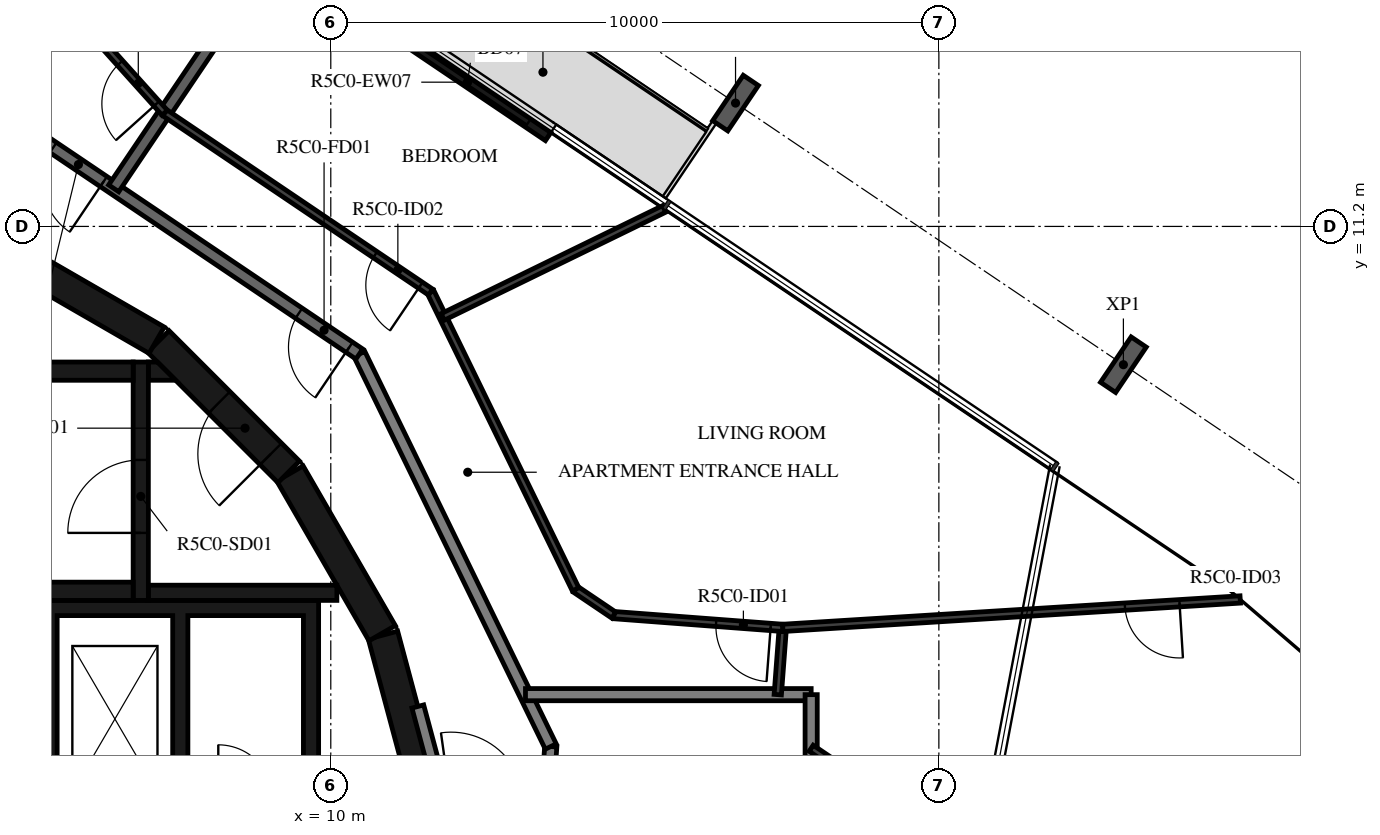
"""IFC4 building model, lengths in metres.
Left out: names, types, materials, properties, quantities, classifications, styles, units other than length and angle.
Written with IfcOpenShell. Run it as: python <this file> out.ifc"""

import sys

from ifc_helpers import new_model, si_unit, direction, frame, frame_2d, origin, origin_2d, place, context, subcontext, project, spatial, polyline, rectangle, i_section, outline, extrude, element, fill, save


model = new_model("IFC4")
c1 = context("Model", 3, precision=1e-05, world=origin(), true_north=direction((0.0, 1.0)))
c2 = subcontext(c1, "Body", "Model", "MODEL_VIEW")
j1 = project(units=[si_unit("LENGTHUNIT", "METRE"), si_unit("PLANEANGLEUNIT", "RADIAN")], contexts=[c1])
p1 = place(None, origin())
s1 = spatial("IfcSite", under=j1, at=p1, CompositionType="ELEMENT")
p2 = place(p1, origin())
s2 = spatial("IfcBuilding", under=s1, at=p2, CompositionType="ELEMENT")
p3 = place(p2, frame((0.0, 0.0, 216.4)))
s3 = spatial("IfcBuildingStorey", under=s2, at=p3, CompositionType="ELEMENT", Elevation=216.4)
for number, where, z_axis, x_axis in (
    (1, (23.035, 8.926, -0.38), (0.0, 0.0, 1.0), (0.829, -0.559, 0.0)),
    (2, (16.656, 13.228, -0.38), (0.0, 0.0, 1.0), (0.829, -0.559, 0.0)),
):
    element("IfcColumn", number, at=place(p3, frame(where, z_axis=z_axis, x_axis=x_axis)), inside=s3, PredefinedType="COLUMN", context=c2, shape_type="SweptSolid", body=[
        extrude(i_section(OverallWidth=0.3, OverallDepth=0.9, WebThickness=0.019, FlangeThickness=0.035, FilletRadius=0.03, at=origin_2d()), origin(), (0.0, 0.0, 1.0), 2.616),
    ])
p4 = place(p3, frame((13.574, 12.677, 0.0), z_axis=(0.0, 0.0, 1.0), x_axis=(-0.829068838882, 0.55914654644, 0.0)))
e3 = element("IfcWall", 3, at=p4, inside=s3, PredefinedType="STANDARD", context=c2, shape_type="SweptSolid", body=[
    extrude(rectangle(XDim=3.2, YDim=0.16, at=frame_2d((1.6, 0.0))), origin(), (0.0, 0.0, 1.0), 3.05),
])
p5 = place(p4, frame((0.4, 0.0, 0.0)))
e4 = element("IfcOpeningElement", 4, at=p5, cuts=e3, PredefinedType="OPENING", context=c2, shape_type="SweptSolid", body=[
    extrude(rectangle(XDim=2.4, YDim=2.4, at=frame_2d((1.2, 1.2))), frame((0.0, 0.09, 0.0), z_axis=(0.0, -1.0, 0.0), x_axis=(1.0, 0.0, 0.0)), (0.0, 0.0, 1.0), 0.18),
])
for number, where, z_axis, x_axis in (
    (5, (11.643, 1.55, 0.0), (0.0, 0.0, 1.0), (-0.259, 0.966, 0.0)),
    (6, (10.845, 4.51, 0.0), (0.0, 0.0, 1.0), (-0.5, 0.866, 0.0)),
):
    element("IfcWall", number, at=place(p3, frame(where, z_axis=z_axis, x_axis=x_axis)), inside=s3, PredefinedType="SHEAR", context=c2, shape_type="SweptSolid", body=[
        extrude(rectangle(XDim=3.033, YDim=0.5, at=frame_2d((1.516, 0.0))), origin(), (0.0, 0.0, 1.0), 3.05),
    ])
p6 = place(p3, frame((9.308, 7.164, 0.0), z_axis=(0.0, 0.0, 1.0), x_axis=(-0.707106781187, 0.707106781187, 0.0)))
e7 = element("IfcWall", 7, at=p6, inside=s3, PredefinedType="SHEAR", context=c2, shape_type="SweptSolid", body=[
    extrude(rectangle(XDim=3.032, YDim=0.5, at=frame_2d((1.516, 0.0))), origin(), (0.0, 0.0, 1.0), 3.05),
])
p7 = place(p6, frame((0.416, 0.0, 0.0)))
e8 = element("IfcOpeningElement", 8, at=p7, cuts=e7, PredefinedType="OPENING", context=c2, shape_type="SweptSolid", body=[
    extrude(rectangle(XDim=1.2, YDim=2.1, at=frame_2d((0.6, 1.05))), frame((0.0, 0.26, 0.0), z_axis=(0.0, -1.0, 0.0), x_axis=(1.0, 0.0, 0.0)), (0.0, 0.0, 1.0), 0.52),
])
p8 = place(p3, frame((7.137, 9.329, 0.0), z_axis=(0.0, 0.0, 1.0), x_axis=(-0.865975092491, 0.500087131594, 0.0)))
e9 = element("IfcWall", 9, at=p8, inside=s3, PredefinedType="SHEAR", context=c2, shape_type="SweptSolid", body=[
    extrude(rectangle(XDim=3.033, YDim=0.5, at=frame_2d((1.516, 0.0))), origin(), (0.0, 0.0, 1.0), 3.05),
])
for number, where, z_axis, x_axis in (
    (10, (0.0, 5.2, 0.0), (0.0, 0.0, 1.0), (1.0, 0.0, 0.0)),
    (11, (0.0, 8.82, 0.0), (0.0, 0.0, 1.0), (1.0, 0.0, 0.0)),
):
    element("IfcWall", number, at=place(p3, frame(where, z_axis=z_axis, x_axis=x_axis)), inside=s3, PredefinedType="SHEAR", context=c2, shape_type="SweptSolid", body=[
        extrude(rectangle(XDim=6.75, YDim=0.3, at=frame_2d((3.375, 0.0))), origin(), (0.0, 0.0, 1.0), 3.05),
    ])
p9 = place(p3, frame((6.875, 5.05, 0.0), z_axis=(0.0, 0.0, 1.0), x_axis=(0.0, 1.0, 0.0)))
e12 = element("IfcWall", 12, at=p9, inside=s3, PredefinedType="SHEAR", context=c2, shape_type="SweptSolid", body=[
    extrude(rectangle(XDim=3.92, YDim=0.25, at=frame_2d((1.96, 0.0))), origin(), (0.0, 0.0, 1.0), 3.05),
])
p10 = place(p9, frame((1.11, 0.0, 0.0)))
e13 = element("IfcOpeningElement", 13, at=p10, cuts=e12, PredefinedType="OPENING", context=c2, shape_type="SweptSolid", body=[
    extrude(rectangle(XDim=1.2, YDim=2.1, at=frame_2d((0.6, 1.05))), frame((0.0, 0.135, 0.0), z_axis=(0.0, -1.0, 0.0), x_axis=(1.0, 0.0, 0.0)), (0.0, 0.0, 1.0), 0.27),
])
p11 = place(p3, frame((7.0, 5.175, 0.0), z_axis=(0.0, 0.0, 1.0), x_axis=(1.0, 0.0, 0.0)))
e14 = element("IfcWall", 14, at=p11, inside=s3, PredefinedType="SHEAR", context=c2, shape_type="SweptSolid", body=[
    extrude(rectangle(XDim=3.1, YDim=0.25, at=frame_2d((1.55, 0.0))), origin(), (0.0, 0.0, 1.0), 3.05),
])
p12 = place(p3, origin())
e15 = element("IfcWall", 15, at=p12, inside=s3, PredefinedType="SHEAR", context=c2, shape_type="SweptSolid", body=[
    extrude(outline(polyline([(7.448, 8.67), (7.0, 8.67), (7.0, 8.97), (7.148, 8.97), (7.448, 8.67)])), origin(), (0.0, 0.0, 1.0), 3.05),
])
p13 = place(p3, origin())
e16 = element("IfcWall", 16, at=p13, inside=s3, PredefinedType="SHEAR", context=c2, shape_type="SweptSolid", body=[
    extrude(outline(polyline([(-9.55, 4.8), (-5.5, 4.8), (-5.5, 1.9), (-5.25, 1.9), (-5.25, 4.8), (-1.2, 4.8), (-1.2, 1.9), (-0.95, 1.9), (-0.95, 4.8), (0.95, 4.8), (0.95, 1.9), (1.2, 1.9), (1.2, 4.8), (3.1, 4.8), (3.1, 1.9), (3.35, 1.9), (3.35, 4.8), (5.25, 4.8), (5.25, 1.9), (5.5, 1.9), (5.5, 4.8), (7.4, 4.8), (7.4, 1.9), (7.65, 1.9), (7.65, 4.8), (9.55, 4.8), (9.55, 1.9), (9.8, 1.9), (9.8, 4.8), (9.8, 5.05), (-9.8, 5.05), (-9.8, 4.8), (-9.8, 1.9), (-9.55, 1.9), (-9.55, 4.8)])), origin(), (0.0, 0.0, 1.0), 3.05),
])
p14 = place(p3, frame((11.87, 1.668, 0.0), z_axis=(0.0, 0.0, 1.0), x_axis=(-0.258836880648, 0.965921047093, 0.0)))
e17 = element("IfcWall", 17, at=p14, inside=s3, PredefinedType="STANDARD", context=c2, shape_type="SweptSolid", body=[
    extrude(rectangle(XDim=1.695, YDim=0.2, at=frame_2d((0.848, 0.0))), origin(), (0.0, 0.0, 1.0), 3.05),
])
p15 = place(p3, frame((13.566, 1.906, 0.0), z_axis=(0.0, 0.0, 1.0), x_axis=(0.07005495793, 0.997543133338, 0.0)))
e18 = element("IfcWall", 18, at=p15, inside=s3, PredefinedType="STANDARD", context=c2, shape_type="SweptSolid", body=[
    extrude(rectangle(XDim=0.742, YDim=0.2, at=frame_2d((0.371, 0.0))), origin(), (0.0, 0.0, 1.0), 3.05),
])
p16 = place(p3, frame((13.618, 2.647, 0.0), z_axis=(0.0, 0.0, 1.0), x_axis=(-0.438366026218, 0.898796543751, 0.0)))
e19 = element("IfcWall", 19, at=p16, inside=s3, PredefinedType="STANDARD", context=c2, shape_type="SweptSolid", body=[
    extrude(rectangle(XDim=7.181, YDim=0.2, at=frame_2d((3.591, 0.0))), origin(), (0.0, 0.0, 1.0), 3.05),
])
p17 = place(p3, frame((10.47, 9.101, 0.0), z_axis=(0.0, 0.0, 1.0), x_axis=(-0.829035841718, 0.559195469534, 0.0)))
e20 = element("IfcWall", 20, at=p17, inside=s3, PredefinedType="STANDARD", context=c2, shape_type="SweptSolid", body=[
    extrude(rectangle(XDim=7.181, YDim=0.2, at=frame_2d((3.591, 0.0))), origin(), (0.0, 0.0, 1.0), 3.05),
])
p18 = place(p17, frame((0.2, 0.0, 0.0)))
e21 = element("IfcOpeningElement", 21, at=p18, cuts=e20, PredefinedType="OPENING", context=c2, shape_type="SweptSolid", body=[
    extrude(rectangle(XDim=1.0, YDim=2.1, at=frame_2d((0.5, 1.05))), frame((0.0, 0.11, 0.0), z_axis=(0.0, -1.0, 0.0), x_axis=(1.0, 0.0, 0.0)), (0.0, 0.0, 1.0), 0.22),
])
p19 = place(p17, frame((5.073, 0.0, 0.0)))
e22 = element("IfcOpeningElement", 22, at=p19, cuts=e20, PredefinedType="OPENING", context=c2, shape_type="SweptSolid", body=[
    extrude(rectangle(XDim=1.0, YDim=2.1, at=frame_2d((0.5, 1.05))), frame((0.0, 0.11, 0.0), z_axis=(0.0, -1.0, 0.0), x_axis=(1.0, 0.0, 0.0)), (0.0, 0.0, 1.0), 0.22),
])
p20 = place(p3, frame((17.9, 3.5, 0.0), z_axis=(0.0, 0.0, 1.0), x_axis=(-1.0, 0.0, 0.0)))
e23 = element("IfcWall", 23, at=p20, inside=s3, PredefinedType="STANDARD", context=c2, shape_type="SweptSolid", body=[
    extrude(rectangle(XDim=4.698, YDim=0.2, at=frame_2d((2.349, 0.0))), origin(), (0.0, 0.0, 1.0), 3.05),
])
p21 = place(p3, frame((17.9, -3.5, 0.0), z_axis=(0.0, 0.0, 1.0), x_axis=(0.0, 1.0, 0.0)))
e24 = element("IfcWall", 24, at=p21, inside=s3, PredefinedType="STANDARD", context=c2, shape_type="SweptSolid", body=[
    extrude(rectangle(XDim=7.0, YDim=0.2, at=frame_2d((3.5, 0.0))), origin(), (0.0, 0.0, 1.0), 3.05),
])
p22 = place(p3, frame((9.104, 15.79, 0.0), z_axis=(0.0, 0.0, 1.0), x_axis=(-0.559193912135, -0.829036892201, 0.0)))
e25 = element("IfcWall", 25, at=p22, inside=s3, PredefinedType="STANDARD", context=c2, shape_type="SweptSolid", body=[
    extrude(rectangle(XDim=4.781, YDim=0.2, at=frame_2d((2.39, 0.0))), origin(), (0.0, 0.0, 1.0), 3.05),
])
p23 = place(p3, frame((17.351, 3.5, 0.0), z_axis=(0.0, 0.0, 1.0), x_axis=(0.075374124137, 0.997155324616, 0.0)))
e26 = element("IfcWall", 26, at=p23, inside=s3, PredefinedType="PARTITIONING", context=c2, shape_type="SweptSolid", body=[
    extrude(rectangle(XDim=1.101, YDim=0.12, at=frame_2d((0.551, 0.0))), origin(), (0.0, 0.0, 1.0), 3.05),
])
p24 = place(p3, frame((17.434, 4.598, 0.0), z_axis=(0.0, 0.0, 1.0), x_axis=(-0.997152077354, 0.075417071205, 0.0)))
e27 = element("IfcWall", 27, at=p24, inside=s3, PredefinedType="PARTITIONING", context=c2, shape_type="SweptSolid", body=[
    extrude(rectangle(XDim=2.787, YDim=0.12, at=frame_2d((1.394, 0.0))), origin(), (0.0, 0.0, 1.0), 3.05),
])
p25 = place(p24, frame((0.2, 0.0, 0.0)))
e28 = element("IfcOpeningElement", 28, at=p25, cuts=e27, PredefinedType="OPENING", context=c2, shape_type="SweptSolid", body=[
    extrude(rectangle(XDim=0.9, YDim=2.1, at=frame_2d((0.45, 1.05))), frame((0.0, 0.07, 0.0), z_axis=(0.0, -1.0, 0.0), x_axis=(1.0, 0.0, 0.0)), (0.0, 0.0, 1.0), 0.14),
])
p26 = place(p3, frame((14.654, 4.808, 0.0), z_axis=(0.0, 0.0, 1.0), x_axis=(-0.829065184024, 0.559151965604, 0.0)))
e29 = element("IfcWall", 29, at=p26, inside=s3, PredefinedType="PARTITIONING", context=c2, shape_type="SweptSolid", body=[
    extrude(rectangle(XDim=0.758, YDim=0.12, at=frame_2d((0.379, 0.0))), origin(), (0.0, 0.0, 1.0), 3.05),
])
p27 = place(p3, frame((14.026, 5.232, 0.0), z_axis=(0.0, 0.0, 1.0), x_axis=(-0.438374985284, 0.89879217413, 0.0)))
e30 = element("IfcWall", 30, at=p27, inside=s3, PredefinedType="PARTITIONING", context=c2, shape_type="SweptSolid", body=[
    extrude(rectangle(XDim=5.438, YDim=0.12, at=frame_2d((2.719, 0.0))), origin(), (0.0, 0.0, 1.0), 3.05),
])
p28 = place(p3, frame((11.642, 10.12, 0.0), z_axis=(0.0, 0.0, 1.0), x_axis=(-0.829054664054, 0.559167563446, 0.0)))
e31 = element("IfcWall", 31, at=p28, inside=s3, PredefinedType="PARTITIONING", context=c2, shape_type="SweptSolid", body=[
    extrude(rectangle(XDim=5.275, YDim=0.12, at=frame_2d((2.637, 0.0))), origin(), (0.0, 0.0, 1.0), 3.05),
])
p29 = place(p28, frame((0.2, 0.0, 0.0)))
e32 = element("IfcOpeningElement", 32, at=p29, cuts=e31, PredefinedType="OPENING", context=c2, shape_type="SweptSolid", body=[
    extrude(rectangle(XDim=0.9, YDim=2.1, at=frame_2d((0.45, 1.05))), frame((0.0, 0.07, 0.0), z_axis=(0.0, -1.0, 0.0), x_axis=(1.0, 0.0, 0.0)), (0.0, 0.0, 1.0), 0.14),
])
p30 = place(p3, frame((21.141, 0.433, 0.0), z_axis=(0.0, 0.0, 1.0), x_axis=(-0.829049908454, 0.559174614313, 0.0)))
e33 = element("IfcWall", 33, at=p30, inside=s3, PredefinedType="PARTITIONING", context=c2, shape_type="SweptSolid", body=[
    extrude(rectangle(XDim=3.909, YDim=0.12, at=frame_2d((1.955, 0.0))), origin(), (0.0, 0.0, 1.0), 3.05),
])
p31 = place(p30, frame((0.8, 0.0, 0.0)))
e34 = element("IfcOpeningElement", 34, at=p31, cuts=e33, PredefinedType="OPENING", context=c2, shape_type="SweptSolid", body=[
    extrude(rectangle(XDim=0.8, YDim=2.1, at=frame_2d((0.4, 1.05))), frame((0.0, 0.07, 0.0), z_axis=(0.0, -1.0, 0.0), x_axis=(1.0, 0.0, 0.0)), (0.0, 0.0, 1.0), 0.14),
])
p32 = place(p3, frame((24.956, 5.065, 0.0), z_axis=(0.0, 0.0, 1.0), x_axis=(-0.998076202118, -0.061999151332, 0.0)))
e35 = element("IfcWall", 35, at=p32, inside=s3, PredefinedType="PARTITIONING", context=c2, shape_type="SweptSolid", body=[
    extrude(rectangle(XDim=7.537, YDim=0.12, at=frame_2d((3.769, 0.0))), origin(), (0.0, 0.0, 1.0), 3.05),
])
p33 = place(p32, frame((1.0, 0.0, 0.0)))
e36 = element("IfcOpeningElement", 36, at=p33, cuts=e35, PredefinedType="OPENING", context=c2, shape_type="SweptSolid", body=[
    extrude(rectangle(XDim=0.9, YDim=2.1, at=frame_2d((0.45, 1.05))), frame((0.0, 0.07, 0.0), z_axis=(0.0, -1.0, 0.0), x_axis=(1.0, 0.0, 0.0)), (0.0, 0.0, 1.0), 0.14),
])
p34 = place(p3, frame((21.95, -0.382, 0.0), z_axis=(0.0, 0.0, 1.0), x_axis=(0.844596663126, 0.535403097336, 0.0)))
e37 = element("IfcWall", 37, at=p34, inside=s3, PredefinedType="PARTITIONING", context=c2, shape_type="SweptSolid", body=[
    extrude(rectangle(XDim=6.022, YDim=0.12, at=frame_2d((3.011, 0.0))), origin(), (0.0, 0.0, 1.0), 3.05),
])
p35 = place(p34, frame((0.6, 0.0, 0.0)))
e38 = element("IfcOpeningElement", 38, at=p35, cuts=e37, PredefinedType="OPENING", context=c2, shape_type="SweptSolid", body=[
    extrude(rectangle(XDim=0.9, YDim=2.1, at=frame_2d((0.45, 1.05))), frame((0.0, 0.07, 0.0), z_axis=(0.0, -1.0, 0.0), x_axis=(1.0, 0.0, 0.0)), (0.0, 0.0, 1.0), 0.14),
])
p36 = place(p3, frame((15.482, 11.487, 0.0), z_axis=(0.0, 0.0, 1.0), x_axis=(-0.898807251285, -0.438344071521, 0.0)))
e39 = element("IfcWall", 39, at=p36, inside=s3, PredefinedType="PARTITIONING", context=c2, shape_type="SweptSolid", body=[
    extrude(rectangle(XDim=4.051, YDim=0.12, at=frame_2d((2.025, 0.0))), origin(), (0.0, 0.0, 1.0), 3.05),
])
p37 = place(p3, frame((7.269, 13.07, 0.0), z_axis=(0.0, 0.0, 1.0), x_axis=(-0.668495993587, 0.743715743116, 0.0)))
e40 = element("IfcWall", 40, at=p37, inside=s3, PredefinedType="PARTITIONING", context=c2, shape_type="SweptSolid", body=[
    extrude(rectangle(XDim=3.281, YDim=0.12, at=frame_2d((1.641, 0.0))), origin(), (0.0, 0.0, 1.0), 3.05),
])
p38 = place(p37, frame((0.2, 0.0, 0.0)))
e41 = element("IfcOpeningElement", 41, at=p38, cuts=e40, PredefinedType="OPENING", context=c2, shape_type="SweptSolid", body=[
    extrude(rectangle(XDim=0.9, YDim=2.1, at=frame_2d((0.45, 1.05))), frame((0.0, 0.07, 0.0), z_axis=(0.0, -1.0, 0.0), x_axis=(1.0, 0.0, 0.0)), (0.0, 0.0, 1.0), 0.14),
])
p39 = place(p5, origin())
e42 = element("IfcDoor", 42, at=p39, inside=s3, OperationType="DOUBLE_DOOR_SLIDING", PredefinedType="DOOR", context=c2, shape_type="SweptSolid", body=[
    extrude(rectangle(XDim=2.4, YDim=2.4, at=frame_2d((1.2, 1.2))), frame((0.0, 0.025, 0.0), z_axis=(0.0, -1.0, 0.0), x_axis=(1.0, 0.0, 0.0)), (0.0, 0.0, 1.0), 0.05),
])
fill(e4, e42)
p40 = place(p10, origin())
e43 = element("IfcDoor", 43, at=p40, inside=s3, OperationType="SINGLE_SWING_LEFT", PredefinedType="DOOR", context=c2, shape_type="SweptSolid", body=[
    extrude(rectangle(XDim=1.2, YDim=2.1, at=frame_2d((0.6, 1.05))), frame((0.0, 0.025, 0.0), z_axis=(0.0, -1.0, 0.0), x_axis=(1.0, 0.0, 0.0)), (0.0, 0.0, 1.0), 0.05),
])
fill(e13, e43)
p41 = place(p7, origin())
e44 = element("IfcDoor", 44, at=p41, inside=s3, OperationType="SINGLE_SWING_RIGHT", PredefinedType="DOOR", context=c2, shape_type="SweptSolid", body=[
    extrude(rectangle(XDim=1.2, YDim=2.1, at=frame_2d((0.6, 1.05))), frame((0.0, 0.025, 0.0), z_axis=(0.0, -1.0, 0.0), x_axis=(1.0, 0.0, 0.0)), (0.0, 0.0, 1.0), 0.05),
])
fill(e8, e44)
p42 = place(p18, origin())
e45 = element("IfcDoor", 45, at=p42, inside=s3, OperationType="SINGLE_SWING_LEFT", PredefinedType="DOOR", context=c2, shape_type="SweptSolid", body=[
    extrude(rectangle(XDim=1.0, YDim=2.1, at=frame_2d((0.5, 1.05))), frame((0.0, 0.025, 0.0), z_axis=(0.0, -1.0, 0.0), x_axis=(1.0, 0.0, 0.0)), (0.0, 0.0, 1.0), 0.05),
])
fill(e21, e45)
p43 = place(p25, origin())
e46 = element("IfcDoor", 46, at=p43, inside=s3, OperationType="SINGLE_SWING_LEFT", PredefinedType="DOOR", context=c2, shape_type="SweptSolid", body=[
    extrude(rectangle(XDim=0.9, YDim=2.1, at=frame_2d((0.45, 1.05))), frame((0.0, 0.025, 0.0), z_axis=(0.0, -1.0, 0.0), x_axis=(1.0, 0.0, 0.0)), (0.0, 0.0, 1.0), 0.05),
])
fill(e28, e46)
p44 = place(p29, origin())
e47 = element("IfcDoor", 47, at=p44, inside=s3, OperationType="SINGLE_SWING_LEFT", PredefinedType="DOOR", context=c2, shape_type="SweptSolid", body=[
    extrude(rectangle(XDim=0.9, YDim=2.1, at=frame_2d((0.45, 1.05))), frame((0.0, 0.025, 0.0), z_axis=(0.0, -1.0, 0.0), x_axis=(1.0, 0.0, 0.0)), (0.0, 0.0, 1.0), 0.05),
])
fill(e32, e47)
p45 = place(p33, origin())
e48 = element("IfcDoor", 48, at=p45, inside=s3, OperationType="SINGLE_SWING_LEFT", PredefinedType="DOOR", context=c2, shape_type="SweptSolid", body=[
    extrude(rectangle(XDim=0.9, YDim=2.1, at=frame_2d((0.45, 1.05))), frame((0.0, 0.025, 0.0), z_axis=(0.0, -1.0, 0.0), x_axis=(1.0, 0.0, 0.0)), (0.0, 0.0, 1.0), 0.05),
])
fill(e36, e48)
p46 = place(p19, origin())
e49 = element("IfcDoor", 49, at=p46, inside=s3, OperationType="SINGLE_SWING_RIGHT", PredefinedType="DOOR", context=c2, shape_type="SweptSolid", body=[
    extrude(rectangle(XDim=1.0, YDim=2.1, at=frame_2d((0.5, 1.05))), frame((0.0, 0.025, 0.0), z_axis=(0.0, -1.0, 0.0), x_axis=(1.0, 0.0, 0.0)), (0.0, 0.0, 1.0), 0.05),
])
fill(e22, e49)
p47 = place(p38, origin())
e50 = element("IfcDoor", 50, at=p47, inside=s3, OperationType="SINGLE_SWING_RIGHT", PredefinedType="DOOR", context=c2, shape_type="SweptSolid", body=[
    extrude(rectangle(XDim=0.9, YDim=2.1, at=frame_2d((0.45, 1.05))), frame((0.0, 0.025, 0.0), z_axis=(0.0, -1.0, 0.0), x_axis=(1.0, 0.0, 0.0)), (0.0, 0.0, 1.0), 0.05),
])
fill(e41, e50)
save(model, sys.argv[1])
